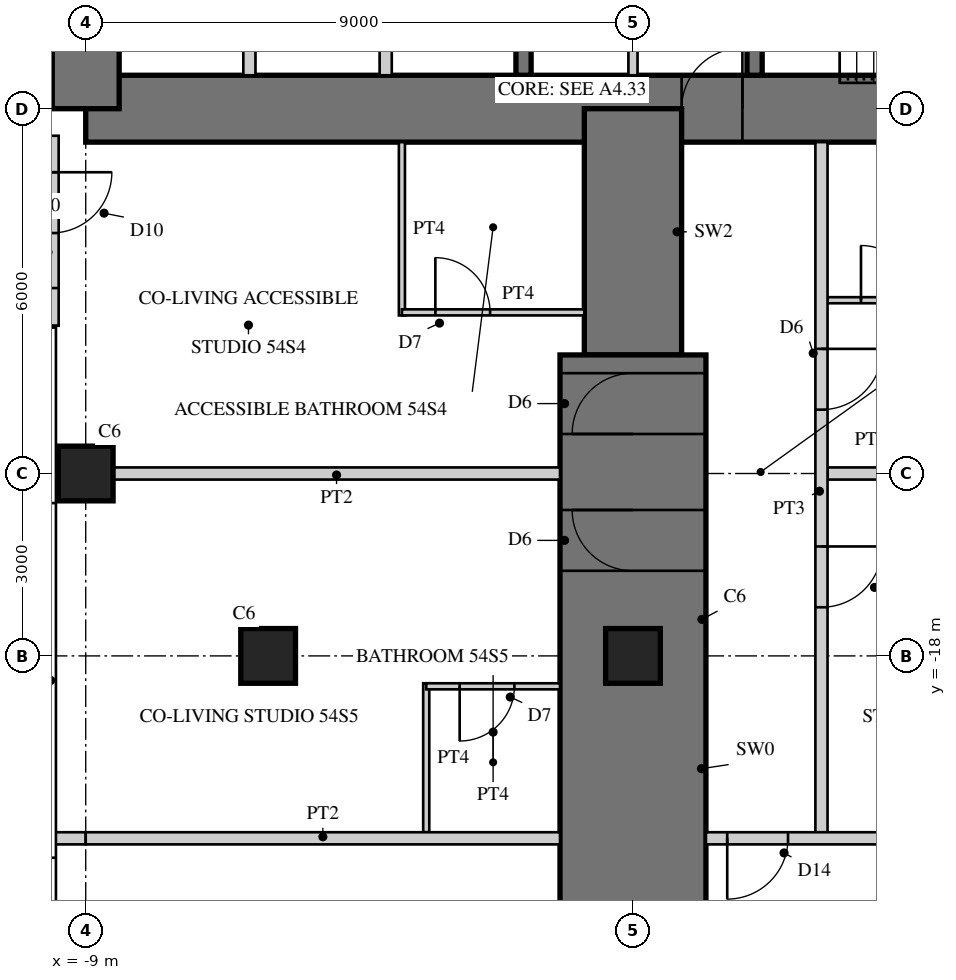
"""IFC4 building model, lengths in metres.
Left out: names, types, materials, properties, quantities, classifications, styles, units other than length and angle.
Written with IfcOpenShell. Run it as: python <this file> out.ifc"""

import sys

from ifc_helpers import new_model, si_unit, direction, frame, frame_2d, origin, origin_2d, place, context, subcontext, project, spatial, rectangle, hollow_rectangle, extrude, element, fill, save


model = new_model("IFC4")
c1 = context("Model", 3, precision=1e-05, world=origin(), true_north=direction((0.0, 1.0)))
c2 = subcontext(c1, "Body", "Model", "MODEL_VIEW")
j1 = project(units=[si_unit("LENGTHUNIT", "METRE"), si_unit("PLANEANGLEUNIT", "RADIAN")], contexts=[c1])
p1 = place(None, origin())
s1 = spatial("IfcSite", under=j1, at=p1, CompositionType="ELEMENT")
p2 = place(p1, origin())
s2 = spatial("IfcBuilding", under=s1, at=p2, CompositionType="ELEMENT")
p3 = place(p2, frame((0.0, 0.0, 213.7)))
s3 = spatial("IfcBuildingStorey", under=s2, at=p3, CompositionType="ELEMENT", Elevation=213.7)
p4 = place(p3, frame((-9.0, -9.0, 0.0), z_axis=(0.0, 0.0, 1.0), x_axis=(1.0, 0.0, 0.0)))
e1 = element("IfcWall", 1, at=p4, inside=s3, PredefinedType="SHEAR", context=c2, shape_type="SweptSolid", body=[
    extrude(rectangle(XDim=18.0, YDim=1.1, at=frame_2d((9.0, 0.0))), origin(), (0.0, 0.0, 1.0), 3.4),
])
p5 = place(p4, frame((9.8, 0.0, 0.0)))
e2 = element("IfcOpeningElement", 2, at=p5, cuts=e1, PredefinedType="OPENING", context=c2, shape_type="SweptSolid", body=[
    extrude(rectangle(XDim=1.0, YDim=2.4, at=frame_2d((0.5, 1.2))), frame((0.0, 0.56, 0.0), z_axis=(0.0, -1.0, 0.0), x_axis=(1.0, 0.0, 0.0)), (0.0, 0.0, 1.0), 1.12),
])
p6 = place(p3, frame((-9.0, 9.0, 0.0), z_axis=(0.0, 0.0, 1.0), x_axis=(0.0, -1.0, 0.0)))
e3 = element("IfcWall", 3, at=p6, inside=s3, PredefinedType="SHEAR", context=c2, shape_type="SweptSolid", body=[
    extrude(rectangle(XDim=18.0, YDim=1.1, at=frame_2d((9.0, 0.0))), origin(), (0.0, 0.0, 1.0), 3.4),
])
p7 = place(p6, frame((9.8, 0.0, 0.0)))
e4 = element("IfcOpeningElement", 4, at=p7, cuts=e3, PredefinedType="OPENING", context=c2, shape_type="SweptSolid", body=[
    extrude(rectangle(XDim=1.0, YDim=2.4, at=frame_2d((0.5, 1.2))), frame((0.0, 0.56, 0.0), z_axis=(0.0, -1.0, 0.0), x_axis=(1.0, 0.0, 0.0)), (0.0, 0.0, 1.0), 1.12),
])
p8 = place(p3, frame((-1.8, -1.875, 0.0), z_axis=(0.0, 0.0, 1.0), x_axis=(0.0, -1.0, 0.0)))
e5 = element("IfcWall", 5, at=p8, inside=s3, PredefinedType="SHEAR", context=c2, shape_type="SweptSolid", body=[
    extrude(rectangle(XDim=6.575, YDim=0.25, at=frame_2d((3.288, 0.0))), origin(), (0.0, 0.0, 1.0), 3.4),
])
p9 = place(p8, frame((1.875, 0.0, 0.0)))
e6 = element("IfcOpeningElement", 6, at=p9, cuts=e5, PredefinedType="OPENING", context=c2, shape_type="SweptSolid", body=[
    extrude(rectangle(XDim=1.6, YDim=2.4, at=frame_2d((0.8, 1.2))), frame((0.0, 0.135, 0.0), z_axis=(0.0, -1.0, 0.0), x_axis=(1.0, 0.0, 0.0)), (0.0, 0.0, 1.0), 0.27),
])
for number, where, z_axis, x_axis in (
    (7, (-4.067, -5.975, 0.0), (0.0, 0.0, 1.0), (0.0, -1.0, 0.0)),
    (8, (-6.308, -5.975, 0.0), (0.0, 0.0, 1.0), (0.0, -1.0, 0.0)),
):
    element("IfcWall", number, at=place(p3, frame(where, z_axis=z_axis, x_axis=x_axis)), inside=s3, PredefinedType="PARTITIONING", context=c2, shape_type="SweptSolid", body=[
        extrude(rectangle(XDim=2.475, YDim=0.2, at=frame_2d((1.237, 0.0))), origin(), (0.0, 0.0, 1.0), 3.4),
    ])
p10 = place(p3, frame((2.0, -1.675, 0.0), z_axis=(0.0, 0.0, 1.0), x_axis=(0.0, -1.0, 0.0)))
e9 = element("IfcWall", 9, at=p10, inside=s3, PredefinedType="SHEAR", context=c2, shape_type="SweptSolid", body=[
    extrude(rectangle(XDim=6.775, YDim=0.25, at=frame_2d((3.387, 0.0))), origin(), (0.0, 0.0, 1.0), 3.4),
])
p11 = place(p10, frame((0.725, 0.0, 0.0)))
e10 = element("IfcOpeningElement", 10, at=p11, cuts=e9, PredefinedType="OPENING", context=c2, shape_type="SweptSolid", body=[
    extrude(rectangle(XDim=1.0, YDim=2.1, at=frame_2d((0.5, 1.05))), frame((0.0, 0.135, 0.0), z_axis=(0.0, -1.0, 0.0), x_axis=(1.0, 0.0, 0.0)), (0.0, 0.0, 1.0), 0.27),
])
p12 = place(p3, frame((0.0, -9.0, 0.0), z_axis=(0.0, 0.0, 1.0), x_axis=(0.0, -1.0, 0.0)))
e11 = element("IfcWall", 11, at=p12, inside=s3, PredefinedType="SHEAR", context=c2, shape_type="SweptSolid", body=[
    extrude(rectangle(XDim=4.05, YDim=1.6, at=frame_2d((2.025, 0.0))), origin(), (0.0, 0.0, 1.0), 3.4),
])
p13 = place(p3, frame((0.0, -13.05, 0.0), z_axis=(0.0, 0.0, 1.0), x_axis=(0.0, -1.0, 0.0)))
e12 = element("IfcWall", 12, at=p13, inside=s3, PredefinedType="SHEAR", context=c2, shape_type="SweptSolid", body=[
    extrude(rectangle(XDim=13.95, YDim=2.4, at=frame_2d((6.975, 0.0))), origin(), (0.0, 0.0, 1.0), 3.4),
])
p14 = place(p13, frame((0.3, 0.0, 0.0)))
e13 = element("IfcOpeningElement", 13, at=p14, cuts=e12, PredefinedType="OPENING", context=c2, shape_type="SweptSolid", body=[
    extrude(rectangle(XDim=1.0, YDim=2.15, at=frame_2d((0.5, 1.075))), frame((0.0, 1.21, 0.0), z_axis=(0.0, -1.0, 0.0), x_axis=(1.0, 0.0, 0.0)), (0.0, 0.0, 1.0), 2.42),
])
p15 = place(p13, frame((2.55, 0.0, 0.0)))
e14 = element("IfcOpeningElement", 14, at=p15, cuts=e12, PredefinedType="OPENING", context=c2, shape_type="SweptSolid", body=[
    extrude(rectangle(XDim=1.0, YDim=2.15, at=frame_2d((0.5, 1.075))), frame((0.0, 1.21, 0.0), z_axis=(0.0, -1.0, 0.0), x_axis=(1.0, 0.0, 0.0)), (0.0, 0.0, 1.0), 2.42),
])
p16 = place(p13, frame((9.2, 0.0, 0.0)))
e15 = element("IfcOpeningElement", 15, at=p16, cuts=e12, PredefinedType="OPENING", context=c2, shape_type="SweptSolid", body=[
    extrude(rectangle(XDim=1.0, YDim=2.0, at=frame_2d((0.5, 1.0))), frame((0.0, 1.21, 0.0), z_axis=(0.0, -1.0, 0.0), x_axis=(1.0, 0.0, 0.0)), (0.0, 0.0, 1.0), 2.42),
])
for number, where, z_axis, x_axis in (
    (16, (-9.0, -15.0, 0.0), (0.0, 0.0, 1.0), (1.0, 0.0, 0.0)),
    (17, (-6.0, -18.0, 0.0), (0.0, 0.0, 1.0), (1.0, 0.0, 0.0)),
    (18, (0.0, -18.0, 0.0), (0.0, 0.0, 1.0), (1.0, 0.0, 0.0)),
):
    element("IfcColumn", number, at=place(p3, frame(where, z_axis=z_axis, x_axis=x_axis)), inside=s3, PredefinedType="COLUMN", context=c2, shape_type="SweptSolid", body=[
        extrude(rectangle(XDim=0.9, YDim=0.9, at=origin_2d()), origin(), (0.0, 0.0, 1.0), 3.4),
    ])
p17 = place(p3, frame((-9.57, -9.445, 0.0), z_axis=(0.0, 0.0, 1.0), x_axis=(0.0, -1.0, 0.0)))
e19 = element("IfcWall", 19, at=p17, inside=s3, PredefinedType="SOLIDWALL", context=c2, shape_type="SweptSolid", body=[
    extrude(rectangle(XDim=3.125, YDim=0.25, at=frame_2d((1.562, 0.0))), origin(), (0.0, 0.0, 1.0), 3.15),
])
p18 = place(p17, frame((0.6, 0.0, 0.0)))
e20 = element("IfcOpeningElement", 20, at=p18, cuts=e19, PredefinedType="OPENING", context=c2, shape_type="SweptSolid", body=[
    extrude(rectangle(XDim=1.0, YDim=2.2, at=frame_2d((0.5, 1.1))), frame((0.0, 0.135, 0.0), z_axis=(0.0, -1.0, 0.0), x_axis=(1.0, 0.0, 0.0)), (0.0, 0.0, 1.0), 0.27),
])
p19 = place(p3, frame((0.0, -5.675, 0.0), z_axis=(0.0, 0.0, 1.0), x_axis=(0.0, -1.0, 0.0)))
e21 = element("IfcWall", 21, at=p19, inside=s3, PredefinedType="PARTITIONING", context=c2, shape_type="SweptSolid", body=[
    extrude(rectangle(XDim=2.775, YDim=0.15, at=frame_2d((1.387, 0.0))), origin(), (0.0, 0.0, 1.0), 3.15),
])
p20 = place(p19, frame((0.4, 0.0, 0.0)))
e22 = element("IfcOpeningElement", 22, at=p20, cuts=e21, PredefinedType="OPENING", context=c2, shape_type="SweptSolid", body=[
    extrude(rectangle(XDim=1.0, YDim=2.1, at=frame_2d((0.5, 1.05))), frame((0.0, 0.085, 0.0), z_axis=(0.0, -1.0, 0.0), x_axis=(1.0, 0.0, 0.0)), (0.0, 0.0, 1.0), 0.17),
])
p21 = place(p3, frame((3.2, -12.15, 0.0), z_axis=(0.0, 0.0, 1.0), x_axis=(1.0, 0.0, 0.0)))
e23 = element("IfcWall", 23, at=p21, inside=s3, PredefinedType="PARTITIONING", context=c2, shape_type="SweptSolid", body=[
    extrude(rectangle(XDim=2.2, YDim=0.1, at=frame_2d((1.1, 0.0))), origin(), (0.0, 0.0, 1.0), 3.15),
])
p22 = place(p21, frame((0.55, 0.0, 0.0)))
e24 = element("IfcOpeningElement", 24, at=p22, cuts=e23, PredefinedType="OPENING", context=c2, shape_type="SweptSolid", body=[
    extrude(rectangle(XDim=0.9, YDim=2.1, at=frame_2d((0.45, 1.05))), frame((0.0, 0.06, 0.0), z_axis=(0.0, -1.0, 0.0), x_axis=(1.0, 0.0, 0.0)), (0.0, 0.0, 1.0), 0.12),
])
p23 = place(p3, frame((-3.8, -9.55, 0.0), z_axis=(0.0, 0.0, 1.0), x_axis=(0.0, -1.0, 0.0)))
e25 = element("IfcWall", 25, at=p23, inside=s3, PredefinedType="PARTITIONING", context=c2, shape_type="SweptSolid", body=[
    extrude(rectangle(XDim=2.85, YDim=0.1, at=frame_2d((1.425, 0.0))), origin(), (0.0, 0.0, 1.0), 3.15),
])
p24 = place(p3, frame((-3.8, -12.35, 0.0), z_axis=(0.0, 0.0, 1.0), x_axis=(1.0, 0.0, 0.0)))
e26 = element("IfcWall", 26, at=p24, inside=s3, PredefinedType="PARTITIONING", context=c2, shape_type="SweptSolid", body=[
    extrude(rectangle(XDim=3.0, YDim=0.1, at=frame_2d((1.5, 0.0))), origin(), (0.0, 0.0, 1.0), 3.15),
])
p25 = place(p24, frame((0.55, 0.0, 0.0)))
e27 = element("IfcOpeningElement", 27, at=p25, cuts=e26, PredefinedType="OPENING", context=c2, shape_type="SweptSolid", body=[
    extrude(rectangle(XDim=0.9, YDim=2.1, at=frame_2d((0.45, 1.05))), frame((0.0, 0.06, 0.0), z_axis=(0.0, -1.0, 0.0), x_axis=(1.0, 0.0, 0.0)), (0.0, 0.0, 1.0), 0.12),
])
p26 = place(p3, frame((3.2, -15.0, 0.0), z_axis=(0.0, 0.0, 1.0), x_axis=(1.0, 0.0, 0.0)))
e28 = element("IfcWall", 28, at=p26, inside=s3, PredefinedType="SOLIDWALL", context=c2, shape_type="SweptSolid", body=[
    extrude(rectangle(XDim=5.35, YDim=0.2, at=frame_2d((2.675, 0.0))), origin(), (0.0, 0.0, 1.0), 2.1),
])
p27 = place(p3, frame((-8.55, -15.0, 0.0), z_axis=(0.0, 0.0, 1.0), x_axis=(1.0, 0.0, 0.0)))
e29 = element("IfcWall", 29, at=p27, inside=s3, PredefinedType="SOLIDWALL", context=c2, shape_type="SweptSolid", body=[
    extrude(rectangle(XDim=7.35, YDim=0.2, at=frame_2d((3.675, 0.0))), origin(), (0.0, 0.0, 1.0), 2.1),
])
p28 = place(p3, frame((-3.4, -18.45, 0.0), z_axis=(0.0, 0.0, 1.0), x_axis=(0.0, -1.0, 0.0)))
e30 = element("IfcWall", 30, at=p28, inside=s3, PredefinedType="PARTITIONING", context=c2, shape_type="SweptSolid", body=[
    extrude(rectangle(XDim=2.45, YDim=0.1, at=frame_2d((1.225, 0.0))), origin(), (0.0, 0.0, 1.0), 3.15),
])
p29 = place(p3, frame((-3.4, -18.5, 0.0), z_axis=(0.0, 0.0, 1.0), x_axis=(1.0, 0.0, 0.0)))
e31 = element("IfcWall", 31, at=p29, inside=s3, PredefinedType="PARTITIONING", context=c2, shape_type="SweptSolid", body=[
    extrude(rectangle(XDim=2.2, YDim=0.1, at=frame_2d((1.1, 0.0))), origin(), (0.0, 0.0, 1.0), 3.15),
])
p30 = place(p29, frame((0.55, 0.0, 0.0)))
e32 = element("IfcOpeningElement", 32, at=p30, cuts=e31, PredefinedType="OPENING", context=c2, shape_type="SweptSolid", body=[
    extrude(rectangle(XDim=0.9, YDim=2.1, at=frame_2d((0.45, 1.05))), frame((0.0, 0.06, 0.0), z_axis=(0.0, -1.0, 0.0), x_axis=(1.0, 0.0, 0.0)), (0.0, 0.0, 1.0), 0.12),
])
p31 = place(p3, frame((3.1, -9.55, 0.0), z_axis=(0.0, 0.0, 1.0), x_axis=(0.0, -1.0, 0.0)))
e33 = element("IfcWall", 33, at=p31, inside=s3, PredefinedType="SOLIDWALL", context=c2, shape_type="SweptSolid", body=[
    extrude(rectangle(XDim=11.45, YDim=0.2, at=frame_2d((5.725, 0.0))), origin(), (0.0, 0.0, 1.0), 3.15),
])
p32 = place(p31, frame((3.4, 0.0, 0.0)))
e34 = element("IfcOpeningElement", 34, at=p32, cuts=e33, PredefinedType="OPENING", context=c2, shape_type="SweptSolid", body=[
    extrude(rectangle(XDim=1.0, YDim=2.15, at=frame_2d((0.5, 1.075))), frame((0.0, 0.11, 0.0), z_axis=(0.0, -1.0, 0.0), x_axis=(1.0, 0.0, 0.0)), (0.0, 0.0, 1.0), 0.22),
])
p33 = place(p31, frame((6.65, 0.0, 0.0)))
e35 = element("IfcOpeningElement", 35, at=p33, cuts=e33, PredefinedType="OPENING", context=c2, shape_type="SweptSolid", body=[
    extrude(rectangle(XDim=1.0, YDim=2.2, at=frame_2d((0.5, 1.1))), frame((0.0, 0.11, 0.0), z_axis=(0.0, -1.0, 0.0), x_axis=(1.0, 0.0, 0.0)), (0.0, 0.0, 1.0), 0.22),
])
p34 = place(p3, frame((-9.53, -21.0, 0.0), z_axis=(0.0, 0.0, 1.0), x_axis=(1.0, 0.0, 0.0)))
e36 = element("IfcWall", 36, at=p34, inside=s3, PredefinedType="SOLIDWALL", context=c2, shape_type="SweptSolid", body=[
    extrude(rectangle(XDim=0.53, YDim=0.2, at=frame_2d((0.265, 0.0))), origin(), (0.0, 0.0, 1.0), 3.15),
])
p35 = place(p3, frame((-9.0, -21.0, 0.0), z_axis=(0.0, 0.0, 1.0), x_axis=(1.0, 0.0, 0.0)))
e37 = element("IfcWall", 37, at=p35, inside=s3, PredefinedType="SOLIDWALL", context=c2, shape_type="SweptSolid", body=[
    extrude(rectangle(XDim=7.8, YDim=0.2, at=frame_2d((3.9, 0.0))), origin(), (0.0, 0.0, 1.0), 2.3),
])
p36 = place(p3, frame((1.2, -21.0, 0.0), z_axis=(0.0, 0.0, 1.0), x_axis=(1.0, 0.0, 0.0)))
e38 = element("IfcWall", 38, at=p36, inside=s3, PredefinedType="SOLIDWALL", context=c2, shape_type="SweptSolid", body=[
    extrude(rectangle(XDim=7.8, YDim=0.2, at=frame_2d((3.9, 0.0))), origin(), (0.0, 0.0, 1.0), 2.3),
])
p37 = place(p36, frame((0.35, 0.0, 0.0)))
e39 = element("IfcOpeningElement", 39, at=p37, cuts=e38, PredefinedType="OPENING", context=c2, shape_type="SweptSolid", body=[
    extrude(rectangle(XDim=1.0, YDim=2.2, at=frame_2d((0.5, 1.1))), frame((0.0, 0.11, 0.0), z_axis=(0.0, -1.0, 0.0), x_axis=(1.0, 0.0, 0.0)), (0.0, 0.0, 1.0), 0.22),
])
p38 = place(p18, origin())
e40 = element("IfcDoor", 40, at=p38, inside=s3, OperationType="SINGLE_SWING_LEFT", PredefinedType="DOOR", context=c2, shape_type="SweptSolid", body=[
    extrude(hollow_rectangle(XDim=1.0, YDim=2.2, WallThickness=0.06, at=frame_2d((0.5, 1.1))), frame((0.0, 0.025, 0.0), z_axis=(0.0, -1.0, 0.0), x_axis=(1.0, 0.0, 0.0)), (0.0, 0.0, 1.0), 0.05),
    extrude(rectangle(XDim=0.879, YDim=2.079, at=frame_2d((0.5, 1.1))), frame((0.0, 0.025, 0.0), z_axis=(0.0, -1.0, 0.0), x_axis=(1.0, 0.0, 0.0)), (0.0, 0.0, 1.0), 0.05),
])
fill(e20, e40)
p39 = place(p22, origin())
e41 = element("IfcDoor", 41, at=p39, inside=s3, OperationType="SINGLE_SWING_LEFT", PredefinedType="DOOR", context=c2, shape_type="SweptSolid", body=[
    extrude(rectangle(XDim=0.9, YDim=2.1, at=frame_2d((0.45, 1.05))), frame((0.0, 0.025, 0.0), z_axis=(0.0, -1.0, 0.0), x_axis=(1.0, 0.0, 0.0)), (0.0, 0.0, 1.0), 0.05),
])
fill(e24, e41)
p40 = place(p25, origin())
e42 = element("IfcDoor", 42, at=p40, inside=s3, OperationType="SINGLE_SWING_LEFT", PredefinedType="DOOR", context=c2, shape_type="SweptSolid", body=[
    extrude(rectangle(XDim=0.9, YDim=2.1, at=frame_2d((0.45, 1.05))), frame((0.0, 0.025, 0.0), z_axis=(0.0, -1.0, 0.0), x_axis=(1.0, 0.0, 0.0)), (0.0, 0.0, 1.0), 0.05),
])
fill(e27, e42)
p41 = place(p30, frame((0.9, 0.0, 0.0), z_axis=(0.0, 0.0, 1.0), x_axis=(-1.0, 0.0, 0.0)))
e43 = element("IfcDoor", 43, at=p41, inside=s3, OperationType="SINGLE_SWING_RIGHT", PredefinedType="DOOR", context=c2, shape_type="SweptSolid", body=[
    extrude(rectangle(XDim=0.9, YDim=2.1, at=frame_2d((0.45, 1.05))), frame((0.0, 0.025, 0.0), z_axis=(0.0, -1.0, 0.0), x_axis=(1.0, 0.0, 0.0)), (0.0, 0.0, 1.0), 0.05),
])
fill(e32, e43)
p42 = place(p32, origin())
e44 = element("IfcDoor", 44, at=p42, inside=s3, OperationType="SINGLE_SWING_LEFT", PredefinedType="DOOR", context=c2, shape_type="SweptSolid", body=[
    extrude(rectangle(XDim=1.0, YDim=2.15, at=frame_2d((0.5, 1.075))), frame((0.0, 0.025, 0.0), z_axis=(0.0, -1.0, 0.0), x_axis=(1.0, 0.0, 0.0)), (0.0, 0.0, 1.0), 0.05),
])
fill(e34, e44)
p43 = place(p33, origin())
e45 = element("IfcDoor", 45, at=p43, inside=s3, OperationType="SINGLE_SWING_LEFT", PredefinedType="DOOR", context=c2, shape_type="SweptSolid", body=[
    extrude(rectangle(XDim=1.0, YDim=2.2, at=frame_2d((0.5, 1.1))), frame((0.0, 0.025, 0.0), z_axis=(0.0, -1.0, 0.0), x_axis=(1.0, 0.0, 0.0)), (0.0, 0.0, 1.0), 0.05),
])
fill(e35, e45)
p44 = place(p37, frame((1.0, 0.0, 0.0), z_axis=(0.0, 0.0, 1.0), x_axis=(-1.0, 0.0, 0.0)))
e46 = element("IfcDoor", 46, at=p44, inside=s3, OperationType="SINGLE_SWING_RIGHT", PredefinedType="DOOR", context=c2, shape_type="SweptSolid", body=[
    extrude(rectangle(XDim=1.0, YDim=2.2, at=frame_2d((0.5, 1.1))), frame((0.0, 0.025, 0.0), z_axis=(0.0, -1.0, 0.0), x_axis=(1.0, 0.0, 0.0)), (0.0, 0.0, 1.0), 0.05),
])
fill(e39, e46)
p45 = place(p14, frame((1.0, 0.0, 0.0), z_axis=(0.0, 0.0, 1.0), x_axis=(-1.0, 0.0, 0.0)))
e47 = element("IfcDoor", 47, at=p45, inside=s3, OperationType="SINGLE_SWING_LEFT", PredefinedType="DOOR", context=c2, shape_type="SweptSolid", body=[
    extrude(rectangle(XDim=1.0, YDim=2.15, at=frame_2d((0.5, 1.075))), frame((0.0, 0.025, 0.0), z_axis=(0.0, -1.0, 0.0), x_axis=(1.0, 0.0, 0.0)), (0.0, 0.0, 1.0), 0.05),
])
fill(e13, e47)
p46 = place(p15, frame((1.0, 0.0, 0.0), z_axis=(0.0, 0.0, 1.0), x_axis=(-1.0, 0.0, 0.0)))
e48 = element("IfcDoor", 48, at=p46, inside=s3, OperationType="SINGLE_SWING_RIGHT", PredefinedType="DOOR", context=c2, shape_type="SweptSolid", body=[
    extrude(rectangle(XDim=1.0, YDim=2.15, at=frame_2d((0.5, 1.075))), frame((0.0, 0.025, 0.0), z_axis=(0.0, -1.0, 0.0), x_axis=(1.0, 0.0, 0.0)), (0.0, 0.0, 1.0), 0.05),
])
fill(e14, e48)
p47 = place(p5, origin())
e49 = element("IfcDoor", 49, at=p47, inside=s3, OperationType="SINGLE_SWING_RIGHT", PredefinedType="DOOR", context=c2, shape_type="SweptSolid", body=[
    extrude(rectangle(XDim=1.0, YDim=2.4, at=frame_2d((0.5, 1.2))), frame((0.0, 0.055, 0.0), z_axis=(0.0, -1.0, 0.0), x_axis=(1.0, 0.0, 0.0)), (0.0, 0.0, 1.0), 0.05),
])
fill(e2, e49)
save(model, sys.argv[1])
